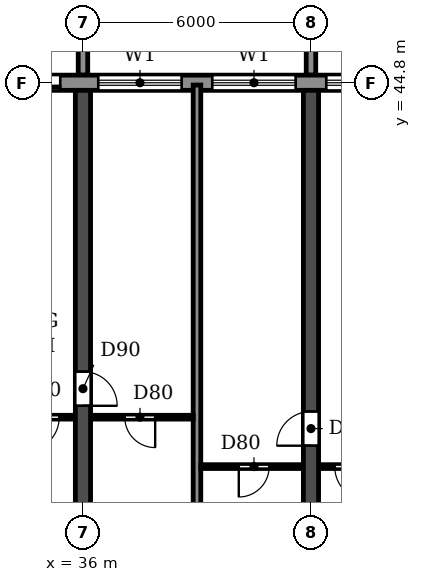
"""IFC4 building model, lengths in metres.
Left out: names, types, materials, properties, quantities, classifications, styles, units other than length and angle.
Written with IfcOpenShell. Run it as: python <this file> out.ifc"""

import sys

from ifc_helpers import new_model, si_unit, direction, frame, frame_2d, origin, place, context, subcontext, project, spatial, polyline, rectangle, outline, extrude, source, transform, mapped, element, fill, save


model = new_model("IFC4")
c1 = context("Model", 3, precision=1e-05, world=origin(), true_north=direction((0.0, 1.0)))
c2 = subcontext(c1, "Body", "Model", "MODEL_VIEW")
j1 = project(units=[si_unit("LENGTHUNIT", "METRE"), si_unit("PLANEANGLEUNIT", "RADIAN")], contexts=[c1])
p1 = place(None, origin())
s1 = spatial("IfcSite", under=j1, at=p1, CompositionType="ELEMENT")
p2 = place(p1, origin())
s2 = spatial("IfcBuilding", under=s1, at=p2, CompositionType="ELEMENT")
p3 = place(p2, frame((0.0, 0.0, 49.8)))
s3 = spatial("IfcBuildingStorey", under=s2, at=p3, CompositionType="ELEMENT", Elevation=49.8)
p4 = place(p3, frame((36.0, 30.55, 0.0), z_axis=(0.0, 0.0, 1.0), x_axis=(0.0, 1.0, 0.0)))
e1 = element("IfcWall", 1, at=p4, inside=s3, PredefinedType="SHEAR", context=c2, shape_type="SweptSolid", body=[
    extrude(rectangle(XDim=14.05, YDim=0.4, at=frame_2d((7.025, 0.0))), origin(), (0.0, 0.0, 1.0), 3.0),
])
p5 = place(p4, frame((5.75, 0.0, 0.0)))
e2 = element("IfcOpeningElement", 2, at=p5, cuts=e1, PredefinedType="OPENING", context=c2, shape_type="SweptSolid", body=[
    extrude(rectangle(XDim=0.9, YDim=2.1, at=frame_2d((0.45, 1.05))), frame((0.0, 0.21, 0.0), z_axis=(0.0, -1.0, 0.0), x_axis=(1.0, 0.0, 0.0)), (0.0, 0.0, 1.0), 0.42),
])
p6 = place(p3, frame((42.0, 30.55, 0.0), z_axis=(0.0, 0.0, 1.0), x_axis=(0.0, 1.0, 0.0)))
e3 = element("IfcWall", 3, at=p6, inside=s3, PredefinedType="SHEAR", context=c2, shape_type="SweptSolid", body=[
    extrude(rectangle(XDim=14.05, YDim=0.4, at=frame_2d((7.025, 0.0))), origin(), (0.0, 0.0, 1.0), 3.0),
])
p7 = place(p6, frame((4.7, 0.0, 0.0)))
e4 = element("IfcOpeningElement", 4, at=p7, cuts=e3, PredefinedType="OPENING", context=c2, shape_type="SweptSolid", body=[
    extrude(rectangle(XDim=0.9, YDim=2.1, at=frame_2d((0.45, 1.05))), frame((0.0, 0.21, 0.0), z_axis=(0.0, -1.0, 0.0), x_axis=(1.0, 0.0, 0.0)), (0.0, 0.0, 1.0), 0.42),
])
p8 = place(p3, frame((97.317, 44.8, 0.0), z_axis=(0.0, 0.0, 1.0), x_axis=(-1.0, 0.0, 0.0)))
e5 = element("IfcWall", 5, at=p8, inside=s3, PredefinedType="STANDARD", context=c2, shape_type="SweptSolid", body=[
    extrude(rectangle(XDim=92.634, YDim=0.4, at=frame_2d((46.317, 0.0))), origin(), (0.0, 0.0, 1.0), 3.0),
])
p9 = place(p8, frame((88.917, 0.0, 0.0)))
e6 = element("IfcOpeningElement", 6, at=p9, cuts=e5, PredefinedType="OPENING", context=c2, shape_type="SweptSolid", body=[
    extrude(rectangle(XDim=1.8, YDim=2.4, at=frame_2d((0.9, 1.2))), frame((0.0, 0.21, 0.0), z_axis=(0.0, -1.0, 0.0), x_axis=(1.0, 0.0, 0.0)), (0.0, 0.0, 1.0), 0.42),
])
p10 = place(p8, frame((85.717, 0.0, 0.9)))
e7 = element("IfcOpeningElement", 7, at=p10, cuts=e5, PredefinedType="OPENING", context=c2, shape_type="SweptSolid", body=[
    extrude(rectangle(XDim=2.2, YDim=1.5, at=frame_2d((1.1, 0.75))), frame((0.0, 0.21, 0.0), z_axis=(0.0, -1.0, 0.0), x_axis=(1.0, 0.0, 0.0)), (0.0, 0.0, 1.0), 0.42),
])
p11 = place(p8, frame((82.717, 0.0, 0.9)))
e8 = element("IfcOpeningElement", 8, at=p11, cuts=e5, PredefinedType="OPENING", context=c2, shape_type="SweptSolid", body=[
    extrude(rectangle(XDim=2.2, YDim=1.5, at=frame_2d((1.1, 0.75))), frame((0.0, 0.21, 0.0), z_axis=(0.0, -1.0, 0.0), x_axis=(1.0, 0.0, 0.0)), (0.0, 0.0, 1.0), 0.42),
])
p12 = place(p8, frame((79.717, 0.0, 0.9)))
e9 = element("IfcOpeningElement", 9, at=p12, cuts=e5, PredefinedType="OPENING", context=c2, shape_type="SweptSolid", body=[
    extrude(rectangle(XDim=2.2, YDim=1.5, at=frame_2d((1.1, 0.75))), frame((0.0, 0.21, 0.0), z_axis=(0.0, -1.0, 0.0), x_axis=(1.0, 0.0, 0.0)), (0.0, 0.0, 1.0), 0.42),
])
p13 = place(p8, frame((76.717, 0.0, 0.9)))
e10 = element("IfcOpeningElement", 10, at=p13, cuts=e5, PredefinedType="OPENING", context=c2, shape_type="SweptSolid", body=[
    extrude(rectangle(XDim=2.2, YDim=1.5, at=frame_2d((1.1, 0.75))), frame((0.0, 0.21, 0.0), z_axis=(0.0, -1.0, 0.0), x_axis=(1.0, 0.0, 0.0)), (0.0, 0.0, 1.0), 0.42),
])
p14 = place(p8, frame((73.917, 0.0, 0.0)))
e11 = element("IfcOpeningElement", 11, at=p14, cuts=e5, PredefinedType="OPENING", context=c2, shape_type="SweptSolid", body=[
    extrude(rectangle(XDim=1.8, YDim=2.4, at=frame_2d((0.9, 1.2))), frame((0.0, 0.21, 0.0), z_axis=(0.0, -1.0, 0.0), x_axis=(1.0, 0.0, 0.0)), (0.0, 0.0, 1.0), 0.42),
])
p15 = place(p8, frame((70.717, 0.0, 0.9)))
e12 = element("IfcOpeningElement", 12, at=p15, cuts=e5, PredefinedType="OPENING", context=c2, shape_type="SweptSolid", body=[
    extrude(rectangle(XDim=2.2, YDim=1.5, at=frame_2d((1.1, 0.75))), frame((0.0, 0.21, 0.0), z_axis=(0.0, -1.0, 0.0), x_axis=(1.0, 0.0, 0.0)), (0.0, 0.0, 1.0), 0.42),
])
p16 = place(p8, frame((67.717, 0.0, 0.9)))
e13 = element("IfcOpeningElement", 13, at=p16, cuts=e5, PredefinedType="OPENING", context=c2, shape_type="SweptSolid", body=[
    extrude(rectangle(XDim=2.2, YDim=1.5, at=frame_2d((1.1, 0.75))), frame((0.0, 0.21, 0.0), z_axis=(0.0, -1.0, 0.0), x_axis=(1.0, 0.0, 0.0)), (0.0, 0.0, 1.0), 0.42),
])
p17 = place(p8, frame((64.717, 0.0, 0.9)))
e14 = element("IfcOpeningElement", 14, at=p17, cuts=e5, PredefinedType="OPENING", context=c2, shape_type="SweptSolid", body=[
    extrude(rectangle(XDim=2.2, YDim=1.5, at=frame_2d((1.1, 0.75))), frame((0.0, 0.21, 0.0), z_axis=(0.0, -1.0, 0.0), x_axis=(1.0, 0.0, 0.0)), (0.0, 0.0, 1.0), 0.42),
])
p18 = place(p8, frame((61.917, 0.0, 0.0)))
e15 = element("IfcOpeningElement", 15, at=p18, cuts=e5, PredefinedType="OPENING", context=c2, shape_type="SweptSolid", body=[
    extrude(rectangle(XDim=1.8, YDim=2.4, at=frame_2d((0.9, 1.2))), frame((0.0, 0.21, 0.0), z_axis=(0.0, -1.0, 0.0), x_axis=(1.0, 0.0, 0.0)), (0.0, 0.0, 1.0), 0.42),
])
p19 = place(p8, frame((58.717, 0.0, 0.9)))
e16 = element("IfcOpeningElement", 16, at=p19, cuts=e5, PredefinedType="OPENING", context=c2, shape_type="SweptSolid", body=[
    extrude(rectangle(XDim=2.2, YDim=1.5, at=frame_2d((1.1, 0.75))), frame((0.0, 0.21, 0.0), z_axis=(0.0, -1.0, 0.0), x_axis=(1.0, 0.0, 0.0)), (0.0, 0.0, 1.0), 0.42),
])
p20 = place(p8, frame((55.717, 0.0, 0.9)))
e17 = element("IfcOpeningElement", 17, at=p20, cuts=e5, PredefinedType="OPENING", context=c2, shape_type="SweptSolid", body=[
    extrude(rectangle(XDim=2.2, YDim=1.5, at=frame_2d((1.1, 0.75))), frame((0.0, 0.21, 0.0), z_axis=(0.0, -1.0, 0.0), x_axis=(1.0, 0.0, 0.0)), (0.0, 0.0, 1.0), 0.42),
])
p21 = place(p8, frame((52.717, 0.0, 0.9)))
e18 = element("IfcOpeningElement", 18, at=p21, cuts=e5, PredefinedType="OPENING", context=c2, shape_type="SweptSolid", body=[
    extrude(rectangle(XDim=2.2, YDim=1.5, at=frame_2d((1.1, 0.75))), frame((0.0, 0.21, 0.0), z_axis=(0.0, -1.0, 0.0), x_axis=(1.0, 0.0, 0.0)), (0.0, 0.0, 1.0), 0.42),
])
p22 = place(p8, frame((49.917, 0.0, 0.0)))
e19 = element("IfcOpeningElement", 19, at=p22, cuts=e5, PredefinedType="OPENING", context=c2, shape_type="SweptSolid", body=[
    extrude(rectangle(XDim=1.8, YDim=2.4, at=frame_2d((0.9, 1.2))), frame((0.0, 0.21, 0.0), z_axis=(0.0, -1.0, 0.0), x_axis=(1.0, 0.0, 0.0)), (0.0, 0.0, 1.0), 0.42),
])
p23 = place(p8, frame((46.717, 0.0, 0.9)))
e20 = element("IfcOpeningElement", 20, at=p23, cuts=e5, PredefinedType="OPENING", context=c2, shape_type="SweptSolid", body=[
    extrude(rectangle(XDim=2.2, YDim=1.5, at=frame_2d((1.1, 0.75))), frame((0.0, 0.21, 0.0), z_axis=(0.0, -1.0, 0.0), x_axis=(1.0, 0.0, 0.0)), (0.0, 0.0, 1.0), 0.42),
])
p24 = place(p8, frame((43.717, 0.0, 0.9)))
e21 = element("IfcOpeningElement", 21, at=p24, cuts=e5, PredefinedType="OPENING", context=c2, shape_type="SweptSolid", body=[
    extrude(rectangle(XDim=2.2, YDim=1.5, at=frame_2d((1.1, 0.75))), frame((0.0, 0.21, 0.0), z_axis=(0.0, -1.0, 0.0), x_axis=(1.0, 0.0, 0.0)), (0.0, 0.0, 1.0), 0.42),
])
p25 = place(p8, frame((40.717, 0.0, 0.9)))
e22 = element("IfcOpeningElement", 22, at=p25, cuts=e5, PredefinedType="OPENING", context=c2, shape_type="SweptSolid", body=[
    extrude(rectangle(XDim=2.2, YDim=1.5, at=frame_2d((1.1, 0.75))), frame((0.0, 0.21, 0.0), z_axis=(0.0, -1.0, 0.0), x_axis=(1.0, 0.0, 0.0)), (0.0, 0.0, 1.0), 0.42),
])
p26 = place(p8, frame((37.917, 0.0, 0.0)))
e23 = element("IfcOpeningElement", 23, at=p26, cuts=e5, PredefinedType="OPENING", context=c2, shape_type="SweptSolid", body=[
    extrude(rectangle(XDim=1.8, YDim=2.4, at=frame_2d((0.9, 1.2))), frame((0.0, 0.21, 0.0), z_axis=(0.0, -1.0, 0.0), x_axis=(1.0, 0.0, 0.0)), (0.0, 0.0, 1.0), 0.42),
])
p27 = place(p8, frame((34.717, 0.0, 0.9)))
e24 = element("IfcOpeningElement", 24, at=p27, cuts=e5, PredefinedType="OPENING", context=c2, shape_type="SweptSolid", body=[
    extrude(rectangle(XDim=2.2, YDim=1.5, at=frame_2d((1.1, 0.75))), frame((0.0, 0.21, 0.0), z_axis=(0.0, -1.0, 0.0), x_axis=(1.0, 0.0, 0.0)), (0.0, 0.0, 1.0), 0.42),
])
p28 = place(p8, frame((31.717, 0.0, 0.9)))
e25 = element("IfcOpeningElement", 25, at=p28, cuts=e5, PredefinedType="OPENING", context=c2, shape_type="SweptSolid", body=[
    extrude(rectangle(XDim=2.2, YDim=1.5, at=frame_2d((1.1, 0.75))), frame((0.0, 0.21, 0.0), z_axis=(0.0, -1.0, 0.0), x_axis=(1.0, 0.0, 0.0)), (0.0, 0.0, 1.0), 0.42),
])
p29 = place(p8, frame((28.717, 0.0, 0.9)))
e26 = element("IfcOpeningElement", 26, at=p29, cuts=e5, PredefinedType="OPENING", context=c2, shape_type="SweptSolid", body=[
    extrude(rectangle(XDim=2.2, YDim=1.5, at=frame_2d((1.1, 0.75))), frame((0.0, 0.21, 0.0), z_axis=(0.0, -1.0, 0.0), x_axis=(1.0, 0.0, 0.0)), (0.0, 0.0, 1.0), 0.42),
])
p30 = place(p8, frame((25.917, 0.0, 0.0)))
e27 = element("IfcOpeningElement", 27, at=p30, cuts=e5, PredefinedType="OPENING", context=c2, shape_type="SweptSolid", body=[
    extrude(rectangle(XDim=1.8, YDim=2.4, at=frame_2d((0.9, 1.2))), frame((0.0, 0.21, 0.0), z_axis=(0.0, -1.0, 0.0), x_axis=(1.0, 0.0, 0.0)), (0.0, 0.0, 1.0), 0.42),
])
p31 = place(p8, frame((22.917, 0.0, 0.0)))
e28 = element("IfcOpeningElement", 28, at=p31, cuts=e5, PredefinedType="OPENING", context=c2, shape_type="SweptSolid", body=[
    extrude(rectangle(XDim=1.8, YDim=2.4, at=frame_2d((0.9, 1.2))), frame((0.0, 0.21, 0.0), z_axis=(0.0, -1.0, 0.0), x_axis=(1.0, 0.0, 0.0)), (0.0, 0.0, 1.0), 0.42),
])
p32 = place(p8, frame((19.717, 0.0, 0.9)))
e29 = element("IfcOpeningElement", 29, at=p32, cuts=e5, PredefinedType="OPENING", context=c2, shape_type="SweptSolid", body=[
    extrude(rectangle(XDim=2.2, YDim=1.5, at=frame_2d((1.1, 0.75))), frame((0.0, 0.21, 0.0), z_axis=(0.0, -1.0, 0.0), x_axis=(1.0, 0.0, 0.0)), (0.0, 0.0, 1.0), 0.42),
])
p33 = place(p8, frame((16.717, 0.0, 0.9)))
e30 = element("IfcOpeningElement", 30, at=p33, cuts=e5, PredefinedType="OPENING", context=c2, shape_type="SweptSolid", body=[
    extrude(rectangle(XDim=2.2, YDim=1.5, at=frame_2d((1.1, 0.75))), frame((0.0, 0.21, 0.0), z_axis=(0.0, -1.0, 0.0), x_axis=(1.0, 0.0, 0.0)), (0.0, 0.0, 1.0), 0.42),
])
p34 = place(p8, frame((13.717, 0.0, 0.9)))
e31 = element("IfcOpeningElement", 31, at=p34, cuts=e5, PredefinedType="OPENING", context=c2, shape_type="SweptSolid", body=[
    extrude(rectangle(XDim=2.2, YDim=1.5, at=frame_2d((1.1, 0.75))), frame((0.0, 0.21, 0.0), z_axis=(0.0, -1.0, 0.0), x_axis=(1.0, 0.0, 0.0)), (0.0, 0.0, 1.0), 0.42),
])
p35 = place(p8, frame((10.717, 0.0, 0.9)))
e32 = element("IfcOpeningElement", 32, at=p35, cuts=e5, PredefinedType="OPENING", context=c2, shape_type="SweptSolid", body=[
    extrude(rectangle(XDim=2.2, YDim=1.5, at=frame_2d((1.1, 0.75))), frame((0.0, 0.21, 0.0), z_axis=(0.0, -1.0, 0.0), x_axis=(1.0, 0.0, 0.0)), (0.0, 0.0, 1.0), 0.42),
])
p36 = place(p8, frame((7.917, 0.0, 0.0)))
e33 = element("IfcOpeningElement", 33, at=p36, cuts=e5, PredefinedType="OPENING", context=c2, shape_type="SweptSolid", body=[
    extrude(rectangle(XDim=1.8, YDim=2.4, at=frame_2d((0.9, 1.2))), frame((0.0, 0.21, 0.0), z_axis=(0.0, -1.0, 0.0), x_axis=(1.0, 0.0, 0.0)), (0.0, 0.0, 1.0), 0.42),
])
p37 = place(p8, frame((4.717, 0.0, 0.9)))
e34 = element("IfcOpeningElement", 34, at=p37, cuts=e5, PredefinedType="OPENING", context=c2, shape_type="SweptSolid", body=[
    extrude(rectangle(XDim=2.2, YDim=1.5, at=frame_2d((1.1, 0.75))), frame((0.0, 0.21, 0.0), z_axis=(0.0, -1.0, 0.0), x_axis=(1.0, 0.0, 0.0)), (0.0, 0.0, 1.0), 0.42),
])
p38 = place(p8, frame((1.917, 0.0, 0.0)))
e35 = element("IfcOpeningElement", 35, at=p38, cuts=e5, PredefinedType="OPENING", context=c2, shape_type="SweptSolid", body=[
    extrude(rectangle(XDim=1.8, YDim=2.4, at=frame_2d((0.9, 1.2))), frame((0.0, 0.21, 0.0), z_axis=(0.0, -1.0, 0.0), x_axis=(1.0, 0.0, 0.0)), (0.0, 0.0, 1.0), 0.42),
])
m1 = source(origin(), c2, "Body", "SweptSolid", [
    extrude(outline(polyline([(0.0, 0.0), (0.25, 0.0), (0.25, 3.1), (0.0, 3.1), (0.0, 0.0)])), origin(), (0.0, 0.0, 1.0), 3.1),
])
for number, where in (
    (36, (35.875, 45.0, 0.0)),
    (37, (41.875, 45.0, 0.0)),
):
    element("IfcWall", number, at=place(p3, frame(where)), inside=s3, PredefinedType="STANDARD", context=c2, shape_type="MappedRepresentation", body=[
        mapped(m1, transform((0.0, 0.0, 0.0))),
    ])
p39 = place(p3, frame((39.0, 30.56, 0.0), z_axis=(0.0, 0.0, 1.0), x_axis=(0.0, 1.0, 0.0)))
e38 = element("IfcWall", 38, at=p39, inside=s3, PredefinedType="PARTITIONING", context=c2, shape_type="SweptSolid", body=[
    extrude(rectangle(XDim=14.18, YDim=0.2, at=frame_2d((7.09, 0.0))), origin(), (0.0, 0.0, 1.0), 3.0),
])
p40 = place(p3, frame((39.1, 34.7, 0.0), z_axis=(0.0, 0.0, 1.0), x_axis=(1.0, 0.0, 0.0)))
e39 = element("IfcWall", 39, at=p40, inside=s3, PredefinedType="PARTITIONING", context=c2, shape_type="SweptSolid", body=[
    extrude(rectangle(XDim=2.69, YDim=0.1, at=frame_2d((1.345, 0.0))), origin(), (0.0, 0.0, 1.0), 3.0),
])
p41 = place(p40, frame((1.0, 0.0, 0.0)))
e40 = element("IfcOpeningElement", 40, at=p41, cuts=e39, PredefinedType="OPENING", context=c2, shape_type="SweptSolid", body=[
    extrude(rectangle(XDim=0.8, YDim=2.1, at=frame_2d((0.4, 1.05))), frame((0.0, 0.06, 0.0), z_axis=(0.0, -1.0, 0.0), x_axis=(1.0, 0.0, 0.0)), (0.0, 0.0, 1.0), 0.12),
])
p42 = place(p3, frame((42.21, 34.7, 0.0), z_axis=(0.0, 0.0, 1.0), x_axis=(1.0, 0.0, 0.0)))
e41 = element("IfcWall", 41, at=p42, inside=s3, PredefinedType="PARTITIONING", context=c2, shape_type="SweptSolid", body=[
    extrude(rectangle(XDim=1.99, YDim=0.1, at=frame_2d((0.995, 0.0))), origin(), (0.0, 0.0, 1.0), 3.0),
])
p43 = place(p42, frame((0.415, 0.0, 0.0)))
e42 = element("IfcOpeningElement", 42, at=p43, cuts=e41, PredefinedType="OPENING", context=c2, shape_type="SweptSolid", body=[
    extrude(rectangle(XDim=0.9, YDim=2.1, at=frame_2d((0.45, 1.05))), frame((0.0, 0.06, 0.0), z_axis=(0.0, -1.0, 0.0), x_axis=(1.0, 0.0, 0.0)), (0.0, 0.0, 1.0), 0.12),
])
p44 = place(p3, frame((33.8, 36.0, 0.0), z_axis=(0.0, 0.0, 1.0), x_axis=(1.0, 0.0, 0.0)))
e43 = element("IfcWall", 43, at=p44, inside=s3, PredefinedType="PARTITIONING", context=c2, shape_type="SweptSolid", body=[
    extrude(rectangle(XDim=1.99, YDim=0.1, at=frame_2d((0.995, 0.0))), origin(), (0.0, 0.0, 1.0), 3.0),
])
p45 = place(p44, frame((0.675, 0.0, 0.0)))
e44 = element("IfcOpeningElement", 44, at=p45, cuts=e43, PredefinedType="OPENING", context=c2, shape_type="SweptSolid", body=[
    extrude(rectangle(XDim=0.9, YDim=2.1, at=frame_2d((0.45, 1.05))), frame((0.0, 0.06, 0.0), z_axis=(0.0, -1.0, 0.0), x_axis=(1.0, 0.0, 0.0)), (0.0, 0.0, 1.0), 0.12),
])
p46 = place(p3, frame((36.21, 36.0, 0.0), z_axis=(0.0, 0.0, 1.0), x_axis=(1.0, 0.0, 0.0)))
e45 = element("IfcWall", 45, at=p46, inside=s3, PredefinedType="PARTITIONING", context=c2, shape_type="SweptSolid", body=[
    extrude(rectangle(XDim=2.69, YDim=0.1, at=frame_2d((1.345, 0.0))), origin(), (0.0, 0.0, 1.0), 3.0),
])
p47 = place(p46, frame((0.89, 0.0, 0.0)))
e46 = element("IfcOpeningElement", 46, at=p47, cuts=e45, PredefinedType="OPENING", context=c2, shape_type="SweptSolid", body=[
    extrude(rectangle(XDim=0.8, YDim=2.1, at=frame_2d((0.4, 1.05))), frame((0.0, 0.06, 0.0), z_axis=(0.0, -1.0, 0.0), x_axis=(1.0, 0.0, 0.0)), (0.0, 0.0, 1.0), 0.12),
])
p48 = place(p18, origin())
e47 = element("IfcDoor", 47, at=p48, inside=s3, OperationType="DOUBLE_DOOR_SLIDING", PredefinedType="DOOR", context=c2, shape_type="SweptSolid", body=[
    extrude(rectangle(XDim=1.8, YDim=2.4, at=frame_2d((0.9, 1.2))), frame((0.0, 0.025, 0.0), z_axis=(0.0, -1.0, 0.0), x_axis=(1.0, 0.0, 0.0)), (0.0, 0.0, 1.0), 0.05),
])
fill(e15, e47)
p49 = place(p19, origin())
e48 = element("IfcWindow", 48, at=p49, inside=s3, PartitioningType="DOUBLE_PANEL_HORIZONTAL", PredefinedType="WINDOW", context=c2, shape_type="SweptSolid", body=[
    extrude(rectangle(XDim=2.2, YDim=1.5, at=frame_2d((1.1, 0.75))), frame((0.0, 0.03, 0.0), z_axis=(0.0, -1.0, 0.0), x_axis=(1.0, 0.0, 0.0)), (0.0, 0.0, 1.0), 0.06),
])
fill(e16, e48)
p50 = place(p20, origin())
e49 = element("IfcWindow", 49, at=p50, inside=s3, PartitioningType="DOUBLE_PANEL_HORIZONTAL", PredefinedType="WINDOW", context=c2, shape_type="SweptSolid", body=[
    extrude(rectangle(XDim=2.2, YDim=1.5, at=frame_2d((1.1, 0.75))), frame((0.0, 0.03, 0.0), z_axis=(0.0, -1.0, 0.0), x_axis=(1.0, 0.0, 0.0)), (0.0, 0.0, 1.0), 0.06),
])
fill(e17, e49)
p51 = place(p21, origin())
e50 = element("IfcWindow", 50, at=p51, inside=s3, PartitioningType="DOUBLE_PANEL_HORIZONTAL", PredefinedType="WINDOW", context=c2, shape_type="SweptSolid", body=[
    extrude(rectangle(XDim=2.2, YDim=1.5, at=frame_2d((1.1, 0.75))), frame((0.0, 0.03, 0.0), z_axis=(0.0, -1.0, 0.0), x_axis=(1.0, 0.0, 0.0)), (0.0, 0.0, 1.0), 0.06),
])
fill(e18, e50)
p52 = place(p47, frame((0.8, 0.0, 0.0), z_axis=(0.0, 0.0, 1.0), x_axis=(-1.0, 0.0, 0.0)))
e51 = element("IfcDoor", 51, at=p52, inside=s3, OperationType="SINGLE_SWING_LEFT", PredefinedType="DOOR", context=c2, shape_type="SweptSolid", body=[
    extrude(rectangle(XDim=0.8, YDim=2.1, at=frame_2d((0.4, 1.05))), frame((0.0, 0.025, 0.0), z_axis=(0.0, -1.0, 0.0), x_axis=(1.0, 0.0, 0.0)), (0.0, 0.0, 1.0), 0.05),
])
fill(e46, e51)
p53 = place(p45, frame((0.9, 0.0, 0.0), z_axis=(0.0, 0.0, 1.0), x_axis=(-1.0, 0.0, 0.0)))
e52 = element("IfcDoor", 52, at=p53, inside=s3, OperationType="SINGLE_SWING_RIGHT", PredefinedType="DOOR", context=c2, shape_type="SweptSolid", body=[
    extrude(rectangle(XDim=0.9, YDim=2.1, at=frame_2d((0.45, 1.05))), frame((0.0, 0.025, 0.0), z_axis=(0.0, -1.0, 0.0), x_axis=(1.0, 0.0, 0.0)), (0.0, 0.0, 1.0), 0.05),
])
fill(e44, e52)
p54 = place(p5, frame((0.9, 0.0, 0.0), z_axis=(0.0, 0.0, 1.0), x_axis=(-1.0, 0.0, 0.0)))
e53 = element("IfcDoor", 53, at=p54, inside=s3, OperationType="SINGLE_SWING_RIGHT", PredefinedType="DOOR", context=c2, shape_type="SweptSolid", body=[
    extrude(rectangle(XDim=0.9, YDim=2.1, at=frame_2d((0.45, 1.05))), frame((0.0, 0.025, 0.0), z_axis=(0.0, -1.0, 0.0), x_axis=(1.0, 0.0, 0.0)), (0.0, 0.0, 1.0), 0.05),
])
fill(e2, e53)
p55 = place(p41, frame((0.8, 0.0, 0.0), z_axis=(0.0, 0.0, 1.0), x_axis=(-1.0, 0.0, 0.0)))
e54 = element("IfcDoor", 54, at=p55, inside=s3, OperationType="SINGLE_SWING_RIGHT", PredefinedType="DOOR", context=c2, shape_type="SweptSolid", body=[
    extrude(rectangle(XDim=0.8, YDim=2.1, at=frame_2d((0.4, 1.05))), frame((0.0, 0.025, 0.0), z_axis=(0.0, -1.0, 0.0), x_axis=(1.0, 0.0, 0.0)), (0.0, 0.0, 1.0), 0.05),
])
fill(e40, e54)
p56 = place(p7, origin())
e55 = element("IfcDoor", 55, at=p56, inside=s3, OperationType="SINGLE_SWING_LEFT", PredefinedType="DOOR", context=c2, shape_type="SweptSolid", body=[
    extrude(rectangle(XDim=0.9, YDim=2.1, at=frame_2d((0.45, 1.05))), frame((0.0, 0.025, 0.0), z_axis=(0.0, -1.0, 0.0), x_axis=(1.0, 0.0, 0.0)), (0.0, 0.0, 1.0), 0.05),
])
fill(e4, e55)
p57 = place(p43, frame((0.9, 0.0, 0.0), z_axis=(0.0, 0.0, 1.0), x_axis=(-1.0, 0.0, 0.0)))
e56 = element("IfcDoor", 56, at=p57, inside=s3, OperationType="SINGLE_SWING_LEFT", PredefinedType="DOOR", context=c2, shape_type="SweptSolid", body=[
    extrude(rectangle(XDim=0.9, YDim=2.1, at=frame_2d((0.45, 1.05))), frame((0.0, 0.025, 0.0), z_axis=(0.0, -1.0, 0.0), x_axis=(1.0, 0.0, 0.0)), (0.0, 0.0, 1.0), 0.05),
])
fill(e42, e56)
save(model, sys.argv[1])
